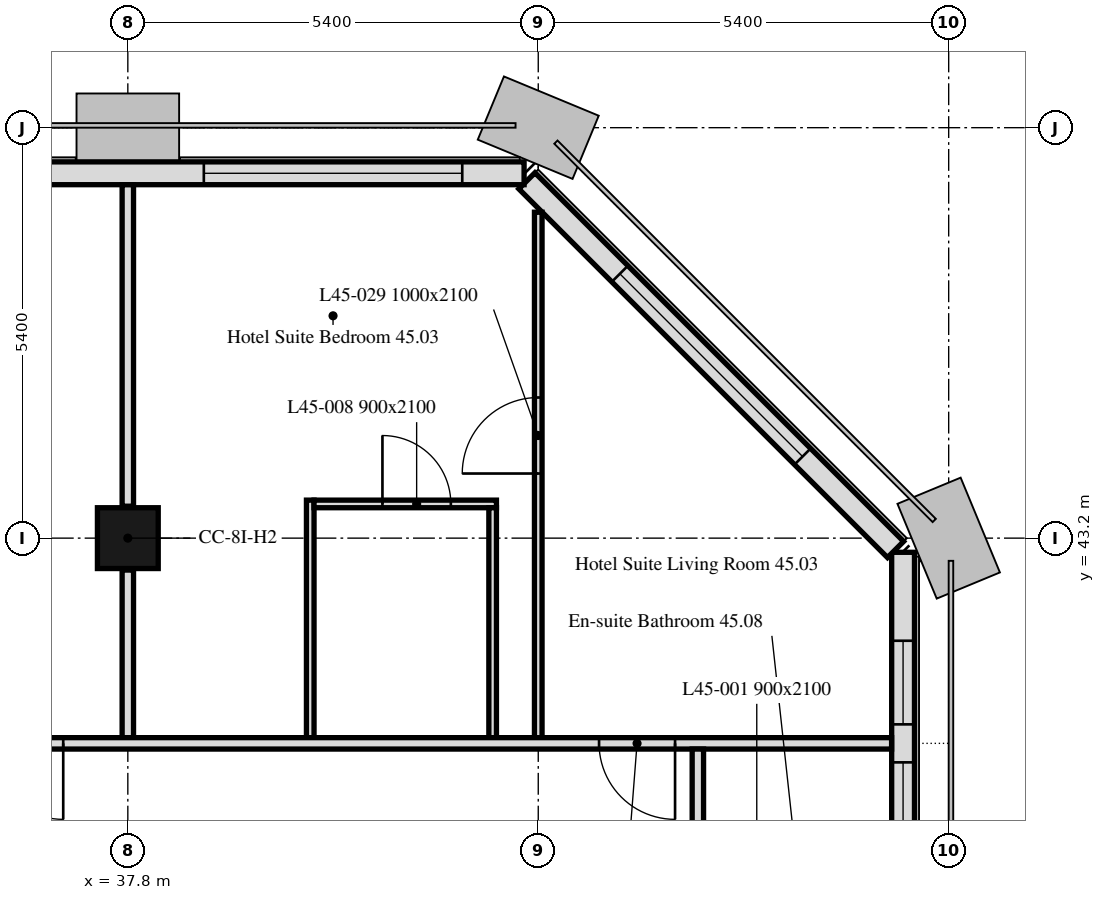
"""IFC4 building model, lengths in metres.
Left out: names, types, materials, properties, quantities, classifications, styles, units other than length and angle.
Written with IfcOpenShell. Run it as: python <this file> out.ifc"""

import sys

from ifc_helpers import new_model, si_unit, direction, frame, frame_2d, origin, origin_2d, place, context, subcontext, project, spatial, rectangle, extrude, element, fill, save


model = new_model("IFC4")
c1 = context("Model", 3, precision=1e-05, world=origin(), true_north=direction((0.0, 1.0)))
c2 = subcontext(c1, "Body", "Model", "MODEL_VIEW")
j1 = project(units=[si_unit("LENGTHUNIT", "METRE"), si_unit("PLANEANGLEUNIT", "RADIAN")], contexts=[c1])
p1 = place(None, origin())
s1 = spatial("IfcSite", under=j1, at=p1, CompositionType="ELEMENT")
p2 = place(p1, origin())
s2 = spatial("IfcBuilding", under=s1, at=p2, CompositionType="ELEMENT")
p3 = place(p2, frame((0.0, 0.0, 187.3)))
s3 = spatial("IfcBuildingStorey", under=s2, at=p3, CompositionType="ELEMENT", Elevation=187.3)
p4 = place(p3, frame((37.8, 43.2, 0.0), z_axis=(0.0, 0.0, 1.0), x_axis=(1.0, 0.0, 0.0)))
e1 = element("IfcColumn", 1, at=p4, inside=s3, PredefinedType="COLUMN", context=c2, shape_type="SweptSolid", body=[
    extrude(rectangle(XDim=0.8, YDim=0.8, at=origin_2d()), origin(), (0.0, 0.0, 1.0), 3.0),
])
p5 = place(p3, frame((48.0, 10.986, 0.0), z_axis=(0.0, 0.0, 1.0), x_axis=(0.0, 1.0, 0.0)))
e2 = element("IfcWall", 2, at=p5, inside=s3, PredefinedType="SOLIDWALL", context=c2, shape_type="SweptSolid", body=[
    extrude(rectangle(XDim=32.027, YDim=0.3, at=frame_2d((16.014, 0.0))), origin(), (0.0, 0.0, 1.0), 3.0),
])
p6 = place(p5, frame((1.164, 0.0, 0.9)))
e3 = element("IfcOpeningElement", 3, at=p6, cuts=e2, PredefinedType="OPENING", context=c2, shape_type="SweptSolid", body=[
    extrude(rectangle(XDim=1.1, YDim=1.7, at=frame_2d((0.55, 0.85))), frame((0.0, 0.16, 0.0), z_axis=(0.0, -1.0, 0.0), x_axis=(1.0, 0.0, 0.0)), (0.0, 0.0, 1.0), 0.32),
])
p7 = place(p5, frame((2.764, 0.0, 0.9)))
e4 = element("IfcOpeningElement", 4, at=p7, cuts=e2, PredefinedType="OPENING", context=c2, shape_type="SweptSolid", body=[
    extrude(rectangle(XDim=1.1, YDim=1.7, at=frame_2d((0.55, 0.85))), frame((0.0, 0.16, 0.0), z_axis=(0.0, -1.0, 0.0), x_axis=(1.0, 0.0, 0.0)), (0.0, 0.0, 1.0), 0.32),
])
p8 = place(p5, frame((6.564, 0.0, 0.9)))
e5 = element("IfcOpeningElement", 5, at=p8, cuts=e2, PredefinedType="OPENING", context=c2, shape_type="SweptSolid", body=[
    extrude(rectangle(XDim=1.1, YDim=1.7, at=frame_2d((0.55, 0.85))), frame((0.0, 0.16, 0.0), z_axis=(0.0, -1.0, 0.0), x_axis=(1.0, 0.0, 0.0)), (0.0, 0.0, 1.0), 0.32),
])
p9 = place(p5, frame((8.164, 0.0, 0.9)))
e6 = element("IfcOpeningElement", 6, at=p9, cuts=e2, PredefinedType="OPENING", context=c2, shape_type="SweptSolid", body=[
    extrude(rectangle(XDim=1.1, YDim=1.7, at=frame_2d((0.55, 0.85))), frame((0.0, 0.16, 0.0), z_axis=(0.0, -1.0, 0.0), x_axis=(1.0, 0.0, 0.0)), (0.0, 0.0, 1.0), 0.32),
])
p10 = place(p5, frame((11.964, 0.0, 0.9)))
e7 = element("IfcOpeningElement", 7, at=p10, cuts=e2, PredefinedType="OPENING", context=c2, shape_type="SweptSolid", body=[
    extrude(rectangle(XDim=1.1, YDim=1.7, at=frame_2d((0.55, 0.85))), frame((0.0, 0.16, 0.0), z_axis=(0.0, -1.0, 0.0), x_axis=(1.0, 0.0, 0.0)), (0.0, 0.0, 1.0), 0.32),
])
p11 = place(p5, frame((13.564, 0.0, 0.9)))
e8 = element("IfcOpeningElement", 8, at=p11, cuts=e2, PredefinedType="OPENING", context=c2, shape_type="SweptSolid", body=[
    extrude(rectangle(XDim=1.1, YDim=1.7, at=frame_2d((0.55, 0.85))), frame((0.0, 0.16, 0.0), z_axis=(0.0, -1.0, 0.0), x_axis=(1.0, 0.0, 0.0)), (0.0, 0.0, 1.0), 0.32),
])
p12 = place(p5, frame((17.364, 0.0, 0.9)))
e9 = element("IfcOpeningElement", 9, at=p12, cuts=e2, PredefinedType="OPENING", context=c2, shape_type="SweptSolid", body=[
    extrude(rectangle(XDim=1.1, YDim=1.7, at=frame_2d((0.55, 0.85))), frame((0.0, 0.16, 0.0), z_axis=(0.0, -1.0, 0.0), x_axis=(1.0, 0.0, 0.0)), (0.0, 0.0, 1.0), 0.32),
])
p13 = place(p5, frame((18.964, 0.0, 0.9)))
e10 = element("IfcOpeningElement", 10, at=p13, cuts=e2, PredefinedType="OPENING", context=c2, shape_type="SweptSolid", body=[
    extrude(rectangle(XDim=1.1, YDim=1.7, at=frame_2d((0.55, 0.85))), frame((0.0, 0.16, 0.0), z_axis=(0.0, -1.0, 0.0), x_axis=(1.0, 0.0, 0.0)), (0.0, 0.0, 1.0), 0.32),
])
p14 = place(p5, frame((22.414, 0.0, 0.9)))
e11 = element("IfcOpeningElement", 11, at=p14, cuts=e2, PredefinedType="OPENING", context=c2, shape_type="SweptSolid", body=[
    extrude(rectangle(XDim=3.4, YDim=1.7, at=frame_2d((1.7, 0.85))), frame((0.0, 0.16, 0.0), z_axis=(0.0, -1.0, 0.0), x_axis=(1.0, 0.0, 0.0)), (0.0, 0.0, 1.0), 0.32),
])
p15 = place(p5, frame((28.164, 0.0, 0.9)))
e12 = element("IfcOpeningElement", 12, at=p15, cuts=e2, PredefinedType="OPENING", context=c2, shape_type="SweptSolid", body=[
    extrude(rectangle(XDim=1.1, YDim=1.7, at=frame_2d((0.55, 0.85))), frame((0.0, 0.16, 0.0), z_axis=(0.0, -1.0, 0.0), x_axis=(1.0, 0.0, 0.0)), (0.0, 0.0, 1.0), 0.32),
])
p16 = place(p5, frame((29.764, 0.0, 0.9)))
e13 = element("IfcOpeningElement", 13, at=p16, cuts=e2, PredefinedType="OPENING", context=c2, shape_type="SweptSolid", body=[
    extrude(rectangle(XDim=1.1, YDim=1.7, at=frame_2d((0.55, 0.85))), frame((0.0, 0.16, 0.0), z_axis=(0.0, -1.0, 0.0), x_axis=(1.0, 0.0, 0.0)), (0.0, 0.0, 1.0), 0.32),
])
p17 = place(p3, frame((47.901, 43.051, 0.0), z_axis=(0.0, 0.0, 1.0), x_axis=(-0.707106781187, 0.707106781187, 0.0)))
e14 = element("IfcWall", 14, at=p17, inside=s3, PredefinedType="SOLIDWALL", context=c2, shape_type="SweptSolid", body=[
    extrude(rectangle(XDim=6.86, YDim=0.3, at=frame_2d((3.43, 0.0))), origin(), (0.0, 0.0, 1.0), 3.0),
])
p18 = place(p17, frame((1.73, 0.0, 0.9)))
e15 = element("IfcOpeningElement", 15, at=p18, cuts=e14, PredefinedType="OPENING", context=c2, shape_type="SweptSolid", body=[
    extrude(rectangle(XDim=3.4, YDim=1.7, at=frame_2d((1.7, 0.85))), frame((0.0, 0.16, 0.0), z_axis=(0.0, -1.0, 0.0), x_axis=(1.0, 0.0, 0.0)), (0.0, 0.0, 1.0), 0.32),
])
p19 = place(p3, frame((43.014, 48.0, 0.0), z_axis=(0.0, 0.0, 1.0), x_axis=(-1.0, 0.0, 0.0)))
e16 = element("IfcWall", 16, at=p19, inside=s3, PredefinedType="SOLIDWALL", context=c2, shape_type="SweptSolid", body=[
    extrude(rectangle(XDim=32.027, YDim=0.3, at=frame_2d((16.014, 0.0))), origin(), (0.0, 0.0, 1.0), 3.0),
])
p20 = place(p19, frame((0.814, 0.0, 0.9)))
e17 = element("IfcOpeningElement", 17, at=p20, cuts=e16, PredefinedType="OPENING", context=c2, shape_type="SweptSolid", body=[
    extrude(rectangle(XDim=3.4, YDim=1.7, at=frame_2d((1.7, 0.85))), frame((0.0, 0.16, 0.0), z_axis=(0.0, -1.0, 0.0), x_axis=(1.0, 0.0, 0.0)), (0.0, 0.0, 1.0), 0.32),
])
p21 = place(p19, frame((6.564, 0.0, 0.9)))
e18 = element("IfcOpeningElement", 18, at=p21, cuts=e16, PredefinedType="OPENING", context=c2, shape_type="SweptSolid", body=[
    extrude(rectangle(XDim=1.1, YDim=1.7, at=frame_2d((0.55, 0.85))), frame((0.0, 0.16, 0.0), z_axis=(0.0, -1.0, 0.0), x_axis=(1.0, 0.0, 0.0)), (0.0, 0.0, 1.0), 0.32),
])
p22 = place(p19, frame((11.614, 0.0, 0.9)))
e19 = element("IfcOpeningElement", 19, at=p22, cuts=e16, PredefinedType="OPENING", context=c2, shape_type="SweptSolid", body=[
    extrude(rectangle(XDim=3.4, YDim=1.7, at=frame_2d((1.7, 0.85))), frame((0.0, 0.16, 0.0), z_axis=(0.0, -1.0, 0.0), x_axis=(1.0, 0.0, 0.0)), (0.0, 0.0, 1.0), 0.32),
])
p23 = place(p19, frame((17.364, 0.0, 0.9)))
e20 = element("IfcOpeningElement", 20, at=p23, cuts=e16, PredefinedType="OPENING", context=c2, shape_type="SweptSolid", body=[
    extrude(rectangle(XDim=1.1, YDim=1.7, at=frame_2d((0.55, 0.85))), frame((0.0, 0.16, 0.0), z_axis=(0.0, -1.0, 0.0), x_axis=(1.0, 0.0, 0.0)), (0.0, 0.0, 1.0), 0.32),
])
p24 = place(p19, frame((22.414, 0.0, 0.9)))
e21 = element("IfcOpeningElement", 21, at=p24, cuts=e16, PredefinedType="OPENING", context=c2, shape_type="SweptSolid", body=[
    extrude(rectangle(XDim=3.4, YDim=1.7, at=frame_2d((1.7, 0.85))), frame((0.0, 0.16, 0.0), z_axis=(0.0, -1.0, 0.0), x_axis=(1.0, 0.0, 0.0)), (0.0, 0.0, 1.0), 0.32),
])
p25 = place(p19, frame((28.164, 0.0, 0.9)))
e22 = element("IfcOpeningElement", 22, at=p25, cuts=e16, PredefinedType="OPENING", context=c2, shape_type="SweptSolid", body=[
    extrude(rectangle(XDim=1.1, YDim=1.7, at=frame_2d((0.55, 0.85))), frame((0.0, 0.16, 0.0), z_axis=(0.0, -1.0, 0.0), x_axis=(1.0, 0.0, 0.0)), (0.0, 0.0, 1.0), 0.32),
])
p26 = place(p3, frame((37.8, 40.575, 0.0), z_axis=(0.0, 0.0, 1.0), x_axis=(0.0, 1.0, 0.0)))
e23 = element("IfcWall", 23, at=p26, inside=s3, PredefinedType="PARTITIONING", context=c2, shape_type="SweptSolid", body=[
    extrude(rectangle(XDim=2.205, YDim=0.15, at=frame_2d((1.103, 0.0))), origin(), (0.0, 0.0, 1.0), 2.4),
])
p27 = place(p3, frame((37.8, 43.62, 0.0), z_axis=(0.0, 0.0, 1.0), x_axis=(0.0, 1.0, 0.0)))
e24 = element("IfcWall", 24, at=p27, inside=s3, PredefinedType="PARTITIONING", context=c2, shape_type="SweptSolid", body=[
    extrude(rectangle(XDim=4.229, YDim=0.15, at=frame_2d((2.115, 0.0))), origin(), (0.0, 0.0, 1.0), 2.4),
])
p28 = place(p3, frame((40.2, 40.575, 0.0), z_axis=(0.0, 0.0, 1.0), x_axis=(0.0, 1.0, 0.0)))
e25 = element("IfcWall", 25, at=p28, inside=s3, PredefinedType="PARTITIONING", context=c2, shape_type="SweptSolid", body=[
    extrude(rectangle(XDim=3.125, YDim=0.1, at=frame_2d((1.562, 0.0))), origin(), (0.0, 0.0, 1.0), 3.0),
])
p29 = place(p3, frame((40.25, 43.65, 0.0), z_axis=(0.0, 0.0, 1.0), x_axis=(1.0, 0.0, 0.0)))
e26 = element("IfcWall", 26, at=p29, inside=s3, PredefinedType="PARTITIONING", context=c2, shape_type="SweptSolid", body=[
    extrude(rectangle(XDim=2.4, YDim=0.1, at=frame_2d((1.2, 0.0))), origin(), (0.0, 0.0, 1.0), 3.0),
])
p30 = place(p29, frame((0.9, 0.0, 0.0)))
e27 = element("IfcOpeningElement", 27, at=p30, cuts=e26, PredefinedType="OPENING", context=c2, shape_type="SweptSolid", body=[
    extrude(rectangle(XDim=0.9, YDim=2.1, at=frame_2d((0.45, 1.05))), frame((0.0, 0.05, 0.0), z_axis=(0.0, -1.0, 0.0), x_axis=(1.0, 0.0, 0.0)), (0.0, 0.0, 1.0), 0.1),
])
p31 = place(p3, frame((42.6, 43.6, 0.0), z_axis=(0.0, 0.0, 1.0), x_axis=(0.0, -1.0, 0.0)))
e28 = element("IfcWall", 28, at=p31, inside=s3, PredefinedType="PARTITIONING", context=c2, shape_type="SweptSolid", body=[
    extrude(rectangle(XDim=3.025, YDim=0.1, at=frame_2d((1.513, 0.0))), origin(), (0.0, 0.0, 1.0), 3.0),
])
p32 = place(p3, frame((43.2, 40.575, 0.0), z_axis=(0.0, 0.0, 1.0), x_axis=(0.0, 1.0, 0.0)))
e29 = element("IfcWall", 29, at=p32, inside=s3, PredefinedType="PARTITIONING", context=c2, shape_type="SweptSolid", body=[
    extrude(rectangle(XDim=6.913, YDim=0.1, at=frame_2d((3.457, 0.0))), origin(), (0.0, 0.0, 1.0), 3.0),
])
p33 = place(p32, frame((3.475, 0.0, 0.0)))
e30 = element("IfcOpeningElement", 30, at=p33, cuts=e29, PredefinedType="OPENING", context=c2, shape_type="SweptSolid", body=[
    extrude(rectangle(XDim=1.0, YDim=2.1, at=frame_2d((0.5, 1.05))), frame((0.0, 0.05, 0.0), z_axis=(0.0, -1.0, 0.0), x_axis=(1.0, 0.0, 0.0)), (0.0, 0.0, 1.0), 0.1),
])
p34 = place(p3, frame((47.849, 40.5, 0.0), z_axis=(0.0, 0.0, 1.0), x_axis=(-1.0, 0.0, 0.0)))
e31 = element("IfcWall", 31, at=p34, inside=s3, PredefinedType="PARTITIONING", context=c2, shape_type="SweptSolid", body=[
    extrude(rectangle(XDim=41.698, YDim=0.15, at=frame_2d((20.849, 0.0))), origin(), (0.0, 0.0, 1.0), 2.4),
])
p35 = place(p34, frame((37.899, 0.0, 0.0)))
e32 = element("IfcOpeningElement", 32, at=p35, cuts=e31, PredefinedType="OPENING", context=c2, shape_type="SweptSolid", body=[
    extrude(rectangle(XDim=1.0, YDim=2.1, at=frame_2d((0.5, 1.05))), frame((0.0, 0.075, 0.0), z_axis=(0.0, -1.0, 0.0), x_axis=(1.0, 0.0, 0.0)), (0.0, 0.0, 1.0), 0.15),
])
p36 = place(p34, frame((32.499, 0.0, 0.0)))
e33 = element("IfcOpeningElement", 33, at=p36, cuts=e31, PredefinedType="OPENING", context=c2, shape_type="SweptSolid", body=[
    extrude(rectangle(XDim=1.0, YDim=2.1, at=frame_2d((0.5, 1.05))), frame((0.0, 0.075, 0.0), z_axis=(0.0, -1.0, 0.0), x_axis=(1.0, 0.0, 0.0)), (0.0, 0.0, 1.0), 0.15),
])
p37 = place(p34, frame((27.099, 0.0, 0.0)))
e34 = element("IfcOpeningElement", 34, at=p37, cuts=e31, PredefinedType="OPENING", context=c2, shape_type="SweptSolid", body=[
    extrude(rectangle(XDim=1.0, YDim=2.1, at=frame_2d((0.5, 1.05))), frame((0.0, 0.075, 0.0), z_axis=(0.0, -1.0, 0.0), x_axis=(1.0, 0.0, 0.0)), (0.0, 0.0, 1.0), 0.15),
])
p38 = place(p34, frame((21.699, 0.0, 0.0)))
e35 = element("IfcOpeningElement", 35, at=p38, cuts=e31, PredefinedType="OPENING", context=c2, shape_type="SweptSolid", body=[
    extrude(rectangle(XDim=1.0, YDim=2.1, at=frame_2d((0.5, 1.05))), frame((0.0, 0.075, 0.0), z_axis=(0.0, -1.0, 0.0), x_axis=(1.0, 0.0, 0.0)), (0.0, 0.0, 1.0), 0.15),
])
p39 = place(p34, frame((16.299, 0.0, 0.0)))
e36 = element("IfcOpeningElement", 36, at=p39, cuts=e31, PredefinedType="OPENING", context=c2, shape_type="SweptSolid", body=[
    extrude(rectangle(XDim=1.0, YDim=2.1, at=frame_2d((0.5, 1.05))), frame((0.0, 0.075, 0.0), z_axis=(0.0, -1.0, 0.0), x_axis=(1.0, 0.0, 0.0)), (0.0, 0.0, 1.0), 0.15),
])
p40 = place(p34, frame((10.899, 0.0, 0.0)))
e37 = element("IfcOpeningElement", 37, at=p40, cuts=e31, PredefinedType="OPENING", context=c2, shape_type="SweptSolid", body=[
    extrude(rectangle(XDim=1.0, YDim=2.1, at=frame_2d((0.5, 1.05))), frame((0.0, 0.075, 0.0), z_axis=(0.0, -1.0, 0.0), x_axis=(1.0, 0.0, 0.0)), (0.0, 0.0, 1.0), 0.15),
])
p41 = place(p34, frame((2.849, 0.0, 0.0)))
e38 = element("IfcOpeningElement", 38, at=p41, cuts=e31, PredefinedType="OPENING", context=c2, shape_type="SweptSolid", body=[
    extrude(rectangle(XDim=1.0, YDim=2.1, at=frame_2d((0.5, 1.05))), frame((0.0, 0.075, 0.0), z_axis=(0.0, -1.0, 0.0), x_axis=(1.0, 0.0, 0.0)), (0.0, 0.0, 1.0), 0.15),
])
p42 = place(p3, frame((45.3, 40.425, 0.0), z_axis=(0.0, 0.0, 1.0), x_axis=(0.0, -1.0, 0.0)))
e39 = element("IfcWall", 39, at=p42, inside=s3, PredefinedType="PARTITIONING", context=c2, shape_type="SweptSolid", body=[
    extrude(rectangle(XDim=28.65, YDim=0.15, at=frame_2d((14.325, 0.0))), origin(), (0.0, 0.0, 1.0), 2.4),
])
p43 = place(p42, frame((10.225, 0.0, 0.0)))
e40 = element("IfcOpeningElement", 40, at=p43, cuts=e39, PredefinedType="OPENING", context=c2, shape_type="SweptSolid", body=[
    extrude(rectangle(XDim=1.0, YDim=2.1, at=frame_2d((0.5, 1.05))), frame((0.0, 0.075, 0.0), z_axis=(0.0, -1.0, 0.0), x_axis=(1.0, 0.0, 0.0)), (0.0, 0.0, 1.0), 0.15),
])
p44 = place(p42, frame((25.975, 0.0, 0.0)))
e41 = element("IfcOpeningElement", 41, at=p44, cuts=e39, PredefinedType="OPENING", context=c2, shape_type="SweptSolid", body=[
    extrude(rectangle(XDim=1.0, YDim=2.1, at=frame_2d((0.5, 1.05))), frame((0.0, 0.075, 0.0), z_axis=(0.0, -1.0, 0.0), x_axis=(1.0, 0.0, 0.0)), (0.0, 0.0, 1.0), 0.15),
])
p45 = place(p42, frame((4.825, 0.0, 0.0)))
e42 = element("IfcOpeningElement", 42, at=p45, cuts=e39, PredefinedType="OPENING", context=c2, shape_type="SweptSolid", body=[
    extrude(rectangle(XDim=1.0, YDim=2.1, at=frame_2d((0.5, 1.05))), frame((0.0, 0.075, 0.0), z_axis=(0.0, -1.0, 0.0), x_axis=(1.0, 0.0, 0.0)), (0.0, 0.0, 1.0), 0.15),
])
p46 = place(p42, frame((19.675, 0.0, 0.0)))
e43 = element("IfcOpeningElement", 43, at=p46, cuts=e39, PredefinedType="OPENING", context=c2, shape_type="SweptSolid", body=[
    extrude(rectangle(XDim=1.0, YDim=2.1, at=frame_2d((0.5, 1.05))), frame((0.0, 0.075, 0.0), z_axis=(0.0, -1.0, 0.0), x_axis=(1.0, 0.0, 0.0)), (0.0, 0.0, 1.0), 0.15),
])
p47 = place(p15, origin())
e44 = element("IfcWindow", 44, at=p47, inside=s3, PartitioningType="SINGLE_PANEL", PredefinedType="WINDOW", context=c2, shape_type="SweptSolid", body=[
    extrude(rectangle(XDim=1.1, YDim=1.7, at=frame_2d((0.55, 0.85))), frame((0.0, 0.03, 0.0), z_axis=(0.0, -1.0, 0.0), x_axis=(1.0, 0.0, 0.0)), (0.0, 0.0, 1.0), 0.06),
])
fill(e12, e44)
p48 = place(p16, origin())
e45 = element("IfcWindow", 45, at=p48, inside=s3, PartitioningType="SINGLE_PANEL", PredefinedType="WINDOW", context=c2, shape_type="SweptSolid", body=[
    extrude(rectangle(XDim=1.1, YDim=1.7, at=frame_2d((0.55, 0.85))), frame((0.0, 0.03, 0.0), z_axis=(0.0, -1.0, 0.0), x_axis=(1.0, 0.0, 0.0)), (0.0, 0.0, 1.0), 0.06),
])
fill(e13, e45)
p49 = place(p18, origin())
e46 = element("IfcWindow", 46, at=p49, inside=s3, PartitioningType="SINGLE_PANEL", PredefinedType="WINDOW", context=c2, shape_type="SweptSolid", body=[
    extrude(rectangle(XDim=3.4, YDim=1.7, at=frame_2d((1.7, 0.85))), frame((0.0, 0.03, 0.0), z_axis=(0.0, -1.0, 0.0), x_axis=(1.0, 0.0, 0.0)), (0.0, 0.0, 1.0), 0.06),
])
fill(e15, e46)
p50 = place(p20, origin())
e47 = element("IfcWindow", 47, at=p50, inside=s3, PartitioningType="SINGLE_PANEL", PredefinedType="WINDOW", context=c2, shape_type="SweptSolid", body=[
    extrude(rectangle(XDim=3.4, YDim=1.7, at=frame_2d((1.7, 0.85))), frame((0.0, 0.03, 0.0), z_axis=(0.0, -1.0, 0.0), x_axis=(1.0, 0.0, 0.0)), (0.0, 0.0, 1.0), 0.06),
])
fill(e17, e47)
p51 = place(p30, origin())
e48 = element("IfcDoor", 48, at=p51, inside=s3, OperationType="SINGLE_SWING_LEFT", PredefinedType="DOOR", context=c2, shape_type="SweptSolid", body=[
    extrude(rectangle(XDim=0.9, YDim=2.1, at=frame_2d((0.45, 1.05))), frame((0.0, 0.025, 0.0), z_axis=(0.0, -1.0, 0.0), x_axis=(1.0, 0.0, 0.0)), (0.0, 0.0, 1.0), 0.05),
])
fill(e27, e48)
p52 = place(p40, origin())
e49 = element("IfcDoor", 49, at=p52, inside=s3, OperationType="SINGLE_SWING_LEFT", PredefinedType="DOOR", context=c2, shape_type="SweptSolid", body=[
    extrude(rectangle(XDim=1.0, YDim=2.1, at=frame_2d((0.5, 1.05))), frame((0.0, 0.025, 0.0), z_axis=(0.0, -1.0, 0.0), x_axis=(1.0, 0.0, 0.0)), (0.0, 0.0, 1.0), 0.05),
])
fill(e37, e49)
p53 = place(p33, origin())
e50 = element("IfcDoor", 50, at=p53, inside=s3, OperationType="SINGLE_SWING_LEFT", PredefinedType="DOOR", context=c2, shape_type="SweptSolid", body=[
    extrude(rectangle(XDim=1.0, YDim=2.1, at=frame_2d((0.5, 1.05))), frame((0.0, 0.025, 0.0), z_axis=(0.0, -1.0, 0.0), x_axis=(1.0, 0.0, 0.0)), (0.0, 0.0, 1.0), 0.05),
])
fill(e30, e50)
p54 = place(p41, origin())
e51 = element("IfcDoor", 51, at=p54, inside=s3, OperationType="SINGLE_SWING_RIGHT", PredefinedType="DOOR", context=c2, shape_type="SweptSolid", body=[
    extrude(rectangle(XDim=1.0, YDim=2.1, at=frame_2d((0.5, 1.05))), frame((0.0, 0.025, 0.0), z_axis=(0.0, -1.0, 0.0), x_axis=(1.0, 0.0, 0.0)), (0.0, 0.0, 1.0), 0.05),
])
fill(e38, e51)
save(model, sys.argv[1])
